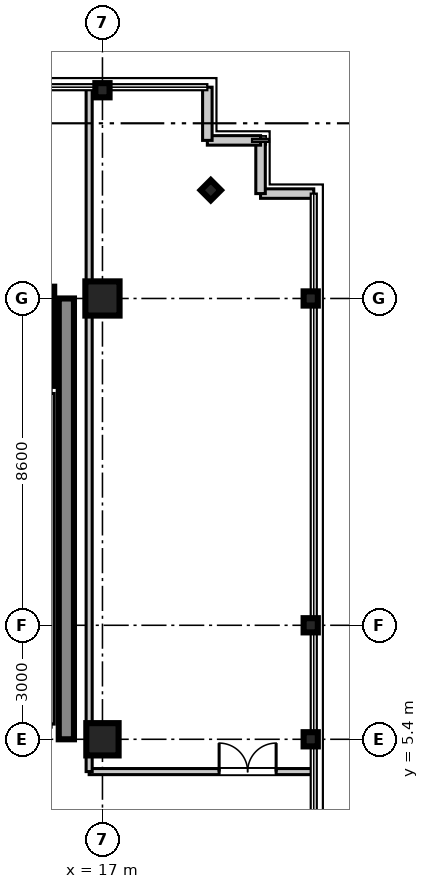
"""IFC4 building model, lengths in metres.
Left out: names, types, materials, properties, quantities, classifications, styles, units other than length and angle.
Written with IfcOpenShell. Run it as: python <this file> out.ifc"""

import sys

from ifc_helpers import new_model, si_unit, direction, frame, frame_2d, origin, origin_2d, place, context, subcontext, project, spatial, rectangle, i_section, extrude, source, transform, mapped, element, fill, save


model = new_model("IFC4")
c1 = context("Model", 3, precision=1e-05, world=origin(), true_north=direction((0.0, 1.0)))
c2 = subcontext(c1, "Body", "Model", "MODEL_VIEW")
j1 = project(units=[si_unit("LENGTHUNIT", "METRE"), si_unit("PLANEANGLEUNIT", "RADIAN")], contexts=[c1])
p1 = place(None, origin())
s1 = spatial("IfcSite", under=j1, at=p1, CompositionType="ELEMENT")
p2 = place(p1, origin())
s2 = spatial("IfcBuilding", under=s1, at=p2, CompositionType="ELEMENT")
p3 = place(p2, frame((0.0, 0.0, 343.05)))
s3 = spatial("IfcBuildingStorey", under=s2, at=p3, CompositionType="ELEMENT", Elevation=343.05)
m1 = source(origin(), c2, "Body", "SweptSolid", [
    extrude(rectangle(XDim=0.85, YDim=0.85, at=origin_2d()), origin(), (0.0, 0.0, 1.0), 4.455),
])
p4 = place(p3, frame((17.0, 5.4, 0.0), z_axis=(0.0, 0.0, 1.0), x_axis=(1.0, 0.0, 0.0)))
e1 = element("IfcColumn", 1, at=p4, inside=s3, PredefinedType="PILASTER", context=c2, shape_type="MappedRepresentation", body=[
    mapped(m1, transform((0.0, 0.0, 0.0), scale=1.0)),
])
m2 = source(origin(), c2, "Body", "SweptSolid", [
    extrude(rectangle(XDim=0.9, YDim=0.9, at=origin_2d()), origin(), (0.0, 0.0, 1.0), 4.455),
])
p5 = place(p3, frame((17.0, 17.0, 0.0), z_axis=(0.0, 0.0, 1.0), x_axis=(1.0, 0.0, 0.0)))
e2 = element("IfcColumn", 2, at=p5, inside=s3, PredefinedType="COLUMN", context=c2, shape_type="MappedRepresentation", body=[
    mapped(m2, transform((0.0, 0.0, 0.0), scale=1.0)),
])
m3 = source(origin(), c2, "Body", "SweptSolid", [
    extrude(i_section(OverallWidth=0.374, OverallDepth=0.374, WebThickness=0.014, FlangeThickness=0.023, at=origin_2d()), origin(), (0.0, 0.0, 1.0), 4.455),
])
for number, where, z_axis, x_axis in (
    (3, (22.48, 5.4, 0.0), (0.0, 0.0, 1.0), (1.0, 0.0, 0.0)),
    (4, (22.48, 8.4, 0.0), (0.0, 0.0, 1.0), (1.0, 0.0, 0.0)),
    (5, (22.48, 17.0, 0.0), (0.0, 0.0, 1.0), (1.0, 0.0, 0.0)),
    (6, (17.0, 22.48, 0.0), (0.0, 0.0, 1.0), (0.0, 1.0, 0.0)),
    (7, (19.85, 19.85, 0.0), (0.0, 0.0, 1.0), (0.707, 0.707, 0.0)),
):
    element("IfcColumn", number, at=place(p3, frame(where, z_axis=z_axis, x_axis=x_axis)), inside=s3, PredefinedType="COLUMN", context=c2, shape_type="MappedRepresentation", body=[
        mapped(m3, transform((0.0, 0.0, 0.0), scale=1.0)),
    ])
m4 = source(origin(), c2, "Body", "SweptSolid", [
    extrude(rectangle(XDim=11.6, YDim=0.4, at=frame_2d((5.8, 0.0))), origin(), (0.0, 0.0, 1.0), 4.17),
])
p6 = place(p3, frame((16.05, 5.4, 0.0), z_axis=(0.0, 0.0, 1.0), x_axis=(0.0, 1.0, 0.0)))
e8 = element("IfcWall", 8, at=p6, inside=s3, PredefinedType="SHEAR", context=c2, shape_type="MappedRepresentation", body=[
    mapped(m4, transform((0.0, 0.0, 0.0), scale=1.0)),
])
m5 = source(origin(), c2, "Body", "SweptSolid", [
    extrude(rectangle(XDim=2.61, YDim=0.22, at=frame_2d((1.305, 0.0))), origin(), (0.0, 0.0, 1.0), 4.17),
])
p7 = place(p3, frame((15.62, 14.7, 0.0), z_axis=(0.0, 0.0, 1.0), x_axis=(0.0, 1.0, 0.0)))
e9 = element("IfcWall", 9, at=p7, inside=s3, PredefinedType="SHEAR", context=c2, shape_type="MappedRepresentation", body=[
    mapped(m5, transform((0.0, 0.0, 0.0), scale=1.0)),
])
m6 = source(origin(), c2, "Body", "SweptSolid", [
    extrude(rectangle(XDim=1.4, YDim=0.25, at=frame_2d((0.7, 0.0))), origin(), (0.0, 0.0, 1.0), 4.17),
])
p8 = place(p3, frame((21.16, 19.76, 0.0), z_axis=(0.0, 0.0, 1.0), x_axis=(1.0, 0.0, 0.0)))
e10 = element("IfcWall", 10, at=p8, inside=s3, PredefinedType="STANDARD", context=c2, shape_type="MappedRepresentation", body=[
    mapped(m6, transform((0.0, 0.0, 0.0), scale=1.0)),
])
m7 = source(origin(), c2, "Body", "SweptSolid", [
    extrude(rectangle(XDim=1.4, YDim=0.25, at=frame_2d((0.7, 0.0))), origin(), (0.0, 0.0, 1.0), 4.17),
])
for number, where, z_axis, x_axis in (
    (11, (21.16, 19.76, 0.0), (0.0, 0.0, 1.0), (0.0, 1.0, 0.0)),
    (12, (19.76, 21.16, 0.0), (0.0, 0.0, 1.0), (1.0, 0.0, 0.0)),
):
    element("IfcWall", number, at=place(p3, frame(where, z_axis=z_axis, x_axis=x_axis)), inside=s3, PredefinedType="STANDARD", context=c2, shape_type="MappedRepresentation", body=[
        mapped(m7, transform((0.0, 0.0, 0.0), scale=1.0)),
    ])
p9 = place(p3, frame((19.76, 21.16, 0.0), z_axis=(0.0, 0.0, 1.0), x_axis=(0.0, 1.0, 0.0)))
e13 = element("IfcWall", 13, at=p9, inside=s3, PredefinedType="STANDARD", context=c2, shape_type="MappedRepresentation", body=[
    mapped(m6, transform((0.0, 0.0, 0.0), scale=1.0)),
])
m8 = source(origin(), c2, "Body", "SweptSolid", [
    extrude(rectangle(XDim=8.7, YDim=0.16, at=frame_2d((4.35, 0.0))), origin(), (0.0, 0.0, 1.0), 3.4),
])
p10 = place(p3, frame((15.65, 5.8, 0.0), z_axis=(0.0, 0.0, 1.0), x_axis=(0.0, 1.0, 0.0)))
e14 = element("IfcWall", 14, at=p10, inside=s3, PredefinedType="PARTITIONING", context=c2, shape_type="MappedRepresentation", body=[
    mapped(m8, transform((0.0, 0.0, 0.0), scale=1.0)),
])
m9 = source(origin(), c2, "Body", "SweptSolid", [
    extrude(rectangle(XDim=5.85, YDim=0.16, at=frame_2d((2.925, 0.0))), origin(), (0.0, 0.0, 1.0), 3.4),
])
p11 = place(p3, frame((16.65, 4.55, 0.0), z_axis=(0.0, 0.0, 1.0), x_axis=(1.0, 0.0, 0.0)))
e15 = element("IfcWall", 15, at=p11, inside=s3, PredefinedType="PARTITIONING", context=c2, shape_type="MappedRepresentation", body=[
    mapped(m9, transform((0.0, 0.0, 0.0), scale=1.0)),
])
p12 = place(p11, frame((3.42, 0.0, 0.0)))
e16 = element("IfcOpeningElement", 16, at=p12, cuts=e15, PredefinedType="OPENING", context=c2, shape_type="SweptSolid", body=[
    extrude(rectangle(XDim=1.5, YDim=2.15, at=frame_2d((0.75, 1.075))), frame((0.0, 0.09, 0.0), z_axis=(0.0, -1.0, 0.0), x_axis=(1.0, 0.0, 0.0)), (0.0, 0.0, 1.0), 0.18),
])
m10 = source(origin(), c2, "Body", "SweptSolid", [
    extrude(rectangle(XDim=17.95, YDim=0.16, at=frame_2d((8.975, 0.0))), origin(), (0.0, 0.0, 1.0), 3.4),
])
p13 = place(p3, frame((16.65, 4.55, 0.0), z_axis=(0.0, 0.0, 1.0), x_axis=(0.0, 1.0, 0.0)))
e17 = element("IfcWall", 17, at=p13, inside=s3, PredefinedType="PARTITIONING", context=c2, shape_type="MappedRepresentation", body=[
    mapped(m10, transform((0.0, 0.0, 0.0), scale=1.0)),
])
m11 = source(origin(), c2, "Body", "SweptSolid", [
    extrude(rectangle(XDim=1.5, YDim=2.15, at=frame_2d((0.75, 1.075))), frame((0.0, 0.025, 0.0), z_axis=(0.0, -1.0, 0.0), x_axis=(1.0, 0.0, 0.0)), (0.0, 0.0, 1.0), 0.05),
])
p14 = place(p12, origin())
e18 = element("IfcDoor", 18, at=p14, inside=s3, OperationType="DOUBLE_DOOR_SINGLE_SWING", PredefinedType="DOOR", context=c2, shape_type="MappedRepresentation", body=[
    mapped(m11, transform((0.0, 0.0, 0.0), scale=1.0)),
])
fill(e16, e18)
save(model, sys.argv[1])
